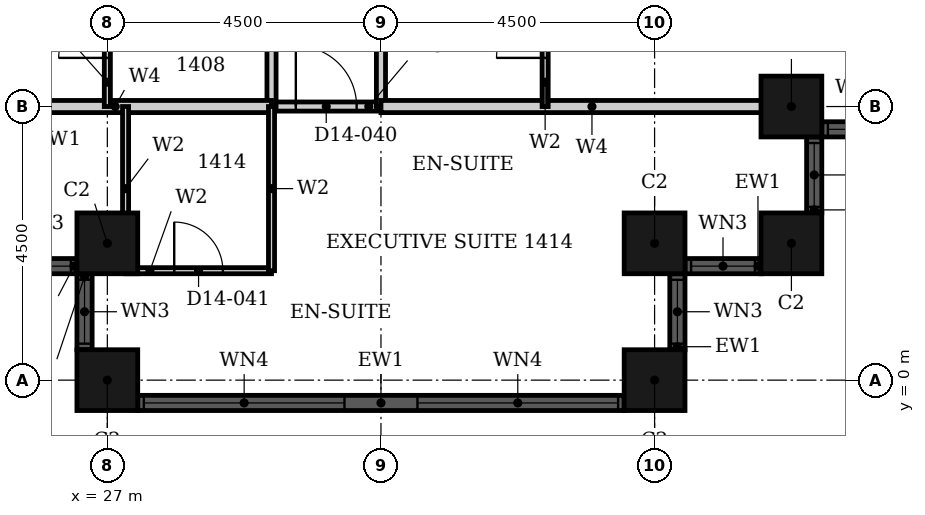
"""IFC4 building model, lengths in metres.
Left out: names, types, materials, properties, quantities, classifications, styles, units other than length and angle.
Written with IfcOpenShell. Run it as: python <this file> out.ifc"""

import sys

from ifc_helpers import new_model, si_unit, direction, frame, frame_2d, origin, origin_2d, place, context, subcontext, project, spatial, rectangle, hollow_rectangle, extrude, element, fill, save


model = new_model("IFC4")
c1 = context("Model", 3, precision=1e-05, world=origin(), true_north=direction((0.0, 1.0)))
c2 = subcontext(c1, "Body", "Model", "MODEL_VIEW")
j1 = project(units=[si_unit("LENGTHUNIT", "METRE"), si_unit("PLANEANGLEUNIT", "RADIAN")], contexts=[c1])
p1 = place(None, origin())
s1 = spatial("IfcSite", under=j1, at=p1, CompositionType="ELEMENT")
p2 = place(p1, origin())
s2 = spatial("IfcBuilding", under=s1, at=p2, CompositionType="ELEMENT")
p3 = place(p2, frame((0.0, 0.0, 63.6)))
s3 = spatial("IfcBuildingStorey", under=s2, at=p3, CompositionType="ELEMENT", Elevation=63.6)
for number, where, z_axis, x_axis in (
    (1, (27.0, 2.25, 0.0), (0.0, 0.0, 1.0), (1.0, 0.0, 0.0)),
    (2, (27.0, 0.0, 0.0), (0.0, 0.0, 1.0), (1.0, 0.0, 0.0)),
    (3, (36.0, 0.0, 0.0), (0.0, 0.0, 1.0), (1.0, 0.0, 0.0)),
    (4, (36.0, 2.25, 0.0), (0.0, 0.0, 1.0), (1.0, 0.0, 0.0)),
    (5, (38.25, 2.25, 0.0), (0.0, 0.0, 1.0), (1.0, 0.0, 0.0)),
    (6, (38.25, 4.5, 0.0), (0.0, 0.0, 1.0), (1.0, 0.0, 0.0)),
):
    element("IfcColumn", number, at=place(p3, frame(where, z_axis=z_axis, x_axis=x_axis)), inside=s3, PredefinedType="COLUMN", context=c2, shape_type="SweptSolid", body=[
        extrude(hollow_rectangle(XDim=1.0, YDim=1.0, WallThickness=0.032, at=origin_2d()), origin(), (0.0, 0.0, 1.0), 3.6),
    ])
p4 = place(p3, frame((25.25, 1.875, 0.0), z_axis=(0.0, 0.0, 1.0), x_axis=(1.0, 0.0, 0.0)))
e7 = element("IfcWall", 7, at=p4, inside=s3, PredefinedType="SOLIDWALL", context=c2, shape_type="SweptSolid", body=[
    extrude(rectangle(XDim=1.25, YDim=0.25, at=frame_2d((0.625, 0.0))), origin(), (0.0, 0.0, 1.0), 3.6),
])
p5 = place(p4, frame((0.1, 0.0, 0.9)))
e8 = element("IfcOpeningElement", 8, at=p5, cuts=e7, PredefinedType="OPENING", context=c2, shape_type="SweptSolid", body=[
    extrude(rectangle(XDim=1.05, YDim=2.08, at=frame_2d((0.525, 1.04))), frame((0.0, 0.135, 0.0), z_axis=(0.0, -1.0, 0.0), x_axis=(1.0, 0.0, 0.0)), (0.0, 0.0, 1.0), 0.27),
])
p6 = place(p3, frame((26.625, 1.75, 0.0), z_axis=(0.0, 0.0, 1.0), x_axis=(0.0, -1.0, 0.0)))
e9 = element("IfcWall", 9, at=p6, inside=s3, PredefinedType="SOLIDWALL", context=c2, shape_type="SweptSolid", body=[
    extrude(rectangle(XDim=1.25, YDim=0.25, at=frame_2d((0.625, 0.0))), origin(), (0.0, 0.0, 1.0), 3.6),
])
p7 = place(p6, frame((0.1, 0.0, 0.9)))
e10 = element("IfcOpeningElement", 10, at=p7, cuts=e9, PredefinedType="OPENING", context=c2, shape_type="SweptSolid", body=[
    extrude(rectangle(XDim=1.05, YDim=2.08, at=frame_2d((0.525, 1.04))), frame((0.0, 0.135, 0.0), z_axis=(0.0, -1.0, 0.0), x_axis=(1.0, 0.0, 0.0)), (0.0, 0.0, 1.0), 0.27),
])
p8 = place(p3, frame((27.5, -0.375, 0.0), z_axis=(0.0, 0.0, 1.0), x_axis=(1.0, 0.0, 0.0)))
e11 = element("IfcWall", 11, at=p8, inside=s3, PredefinedType="SOLIDWALL", context=c2, shape_type="SweptSolid", body=[
    extrude(rectangle(XDim=8.0, YDim=0.25, at=frame_2d((4.0, 0.0))), origin(), (0.0, 0.0, 1.0), 3.6),
])
p9 = place(p8, frame((0.1, 0.0, 0.9)))
e12 = element("IfcOpeningElement", 12, at=p9, cuts=e11, PredefinedType="OPENING", context=c2, shape_type="SweptSolid", body=[
    extrude(rectangle(XDim=3.3, YDim=2.08, at=frame_2d((1.65, 1.04))), frame((0.0, 0.135, 0.0), z_axis=(0.0, -1.0, 0.0), x_axis=(1.0, 0.0, 0.0)), (0.0, 0.0, 1.0), 0.27),
])
p10 = place(p8, frame((4.6, 0.0, 0.9)))
e13 = element("IfcOpeningElement", 13, at=p10, cuts=e11, PredefinedType="OPENING", context=c2, shape_type="SweptSolid", body=[
    extrude(rectangle(XDim=3.3, YDim=2.08, at=frame_2d((1.65, 1.04))), frame((0.0, 0.135, 0.0), z_axis=(0.0, -1.0, 0.0), x_axis=(1.0, 0.0, 0.0)), (0.0, 0.0, 1.0), 0.27),
])
p11 = place(p3, frame((36.375, 0.5, 0.0), z_axis=(0.0, 0.0, 1.0), x_axis=(0.0, 1.0, 0.0)))
e14 = element("IfcWall", 14, at=p11, inside=s3, PredefinedType="SOLIDWALL", context=c2, shape_type="SweptSolid", body=[
    extrude(rectangle(XDim=1.25, YDim=0.25, at=frame_2d((0.625, 0.0))), origin(), (0.0, 0.0, 1.0), 3.6),
])
p12 = place(p11, frame((0.1, 0.0, 0.9)))
e15 = element("IfcOpeningElement", 15, at=p12, cuts=e14, PredefinedType="OPENING", context=c2, shape_type="SweptSolid", body=[
    extrude(rectangle(XDim=1.05, YDim=2.08, at=frame_2d((0.525, 1.04))), frame((0.0, 0.135, 0.0), z_axis=(0.0, -1.0, 0.0), x_axis=(1.0, 0.0, 0.0)), (0.0, 0.0, 1.0), 0.27),
])
p13 = place(p3, frame((36.5, 1.875, 0.0), z_axis=(0.0, 0.0, 1.0), x_axis=(1.0, 0.0, 0.0)))
e16 = element("IfcWall", 16, at=p13, inside=s3, PredefinedType="SOLIDWALL", context=c2, shape_type="SweptSolid", body=[
    extrude(rectangle(XDim=1.25, YDim=0.25, at=frame_2d((0.625, 0.0))), origin(), (0.0, 0.0, 1.0), 3.6),
])
p14 = place(p13, frame((0.1, 0.0, 0.9)))
e17 = element("IfcOpeningElement", 17, at=p14, cuts=e16, PredefinedType="OPENING", context=c2, shape_type="SweptSolid", body=[
    extrude(rectangle(XDim=1.05, YDim=2.08, at=frame_2d((0.525, 1.04))), frame((0.0, 0.135, 0.0), z_axis=(0.0, -1.0, 0.0), x_axis=(1.0, 0.0, 0.0)), (0.0, 0.0, 1.0), 0.27),
])
p15 = place(p3, frame((38.625, 2.75, 0.0), z_axis=(0.0, 0.0, 1.0), x_axis=(0.0, 1.0, 0.0)))
e18 = element("IfcWall", 18, at=p15, inside=s3, PredefinedType="SOLIDWALL", context=c2, shape_type="SweptSolid", body=[
    extrude(rectangle(XDim=1.25, YDim=0.25, at=frame_2d((0.625, 0.0))), origin(), (0.0, 0.0, 1.0), 3.6),
])
p16 = place(p15, frame((0.1, 0.0, 0.9)))
e19 = element("IfcOpeningElement", 19, at=p16, cuts=e18, PredefinedType="OPENING", context=c2, shape_type="SweptSolid", body=[
    extrude(rectangle(XDim=1.05, YDim=2.08, at=frame_2d((0.525, 1.04))), frame((0.0, 0.135, 0.0), z_axis=(0.0, -1.0, 0.0), x_axis=(1.0, 0.0, 0.0)), (0.0, 0.0, 1.0), 0.27),
])
p17 = place(p3, frame((38.75, 4.125, 0.0), z_axis=(0.0, 0.0, 1.0), x_axis=(1.0, 0.0, 0.0)))
e20 = element("IfcWall", 20, at=p17, inside=s3, PredefinedType="SOLIDWALL", context=c2, shape_type="SweptSolid", body=[
    extrude(rectangle(XDim=1.25, YDim=0.25, at=frame_2d((0.625, 0.0))), origin(), (0.0, 0.0, 1.0), 3.6),
])
p18 = place(p17, frame((0.1, 0.0, 0.9)))
e21 = element("IfcOpeningElement", 21, at=p18, cuts=e20, PredefinedType="OPENING", context=c2, shape_type="SweptSolid", body=[
    extrude(rectangle(XDim=1.05, YDim=2.08, at=frame_2d((0.525, 1.04))), frame((0.0, 0.135, 0.0), z_axis=(0.0, -1.0, 0.0), x_axis=(1.0, 0.0, 0.0)), (0.0, 0.0, 1.0), 0.27),
])
p19 = place(p3, frame((29.7, 4.5, 0.0), z_axis=(0.0, 0.0, 1.0), x_axis=(1.0, 0.0, 0.0)))
e22 = element("IfcWall", 22, at=p19, inside=s3, PredefinedType="PARTITIONING", context=c2, shape_type="SweptSolid", body=[
    extrude(rectangle(XDim=1.8, YDim=0.15, at=frame_2d((0.9, 0.0))), origin(), (0.0, 0.0, 1.0), 3.3),
])
p20 = place(p19, frame((0.4, 0.0, 0.0)))
e23 = element("IfcOpeningElement", 23, at=p20, cuts=e22, PredefinedType="OPENING", context=c2, shape_type="SweptSolid", body=[
    extrude(rectangle(XDim=1.0, YDim=2.1, at=frame_2d((0.5, 1.05))), frame((0.0, 0.085, 0.0), z_axis=(0.0, -1.0, 0.0), x_axis=(1.0, 0.0, 0.0)), (0.0, 0.0, 1.0), 0.17),
])
p21 = place(p3, frame((29.7, 4.5, 0.0), z_axis=(0.0, 0.0, 1.0), x_axis=(0.0, 1.0, 0.0)))
e24 = element("IfcWall", 24, at=p21, inside=s3, PredefinedType="PARTITIONING", context=c2, shape_type="SweptSolid", body=[
    extrude(rectangle(XDim=16.2, YDim=0.15, at=frame_2d((8.1, 0.0))), origin(), (0.0, 0.0, 1.0), 3.3),
])
p22 = place(p21, frame((6.25, 0.0, 0.0)))
e25 = element("IfcOpeningElement", 25, at=p22, cuts=e24, PredefinedType="OPENING", context=c2, shape_type="SweptSolid", body=[
    extrude(rectangle(XDim=1.0, YDim=2.1, at=frame_2d((0.5, 1.05))), frame((0.0, 0.085, 0.0), z_axis=(0.0, -1.0, 0.0), x_axis=(1.0, 0.0, 0.0)), (0.0, 0.0, 1.0), 0.17),
])
p23 = place(p3, frame((31.5, 4.5, 0.0), z_axis=(0.0, 0.0, 1.0), x_axis=(0.0, 1.0, 0.0)))
e26 = element("IfcWall", 26, at=p23, inside=s3, PredefinedType="PARTITIONING", context=c2, shape_type="SweptSolid", body=[
    extrude(rectangle(XDim=16.2, YDim=0.15, at=frame_2d((8.1, 0.0))), origin(), (0.0, 0.0, 1.0), 2.58),
])
p24 = place(p23, frame((7.45, 0.0, 0.0)))
e27 = element("IfcOpeningElement", 27, at=p24, cuts=e26, PredefinedType="OPENING", context=c2, shape_type="SweptSolid", body=[
    extrude(rectangle(XDim=1.0, YDim=2.1, at=frame_2d((0.5, 1.05))), frame((0.0, 0.085, 0.0), z_axis=(0.0, -1.0, 0.0), x_axis=(1.0, 0.0, 0.0)), (0.0, 0.0, 1.0), 0.17),
])
p25 = place(p23, frame((2.95, 0.0, 0.0)))
e28 = element("IfcOpeningElement", 28, at=p25, cuts=e26, PredefinedType="OPENING", context=c2, shape_type="SweptSolid", body=[
    extrude(rectangle(XDim=1.0, YDim=2.1, at=frame_2d((0.5, 1.05))), frame((0.0, 0.085, 0.0), z_axis=(0.0, -1.0, 0.0), x_axis=(1.0, 0.0, 0.0)), (0.0, 0.0, 1.0), 0.17),
])
p26 = place(p3, frame((31.5, 4.5, 0.0), z_axis=(0.0, 0.0, 1.0), x_axis=(1.0, 0.0, 0.0)))
e29 = element("IfcWall", 29, at=p26, inside=s3, PredefinedType="PARTITIONING", context=c2, shape_type="SweptSolid", body=[
    extrude(rectangle(XDim=6.94, YDim=0.2, at=frame_2d((3.47, 0.0))), origin(), (0.0, 0.0, 1.0), 3.3),
])
p27 = place(p3, frame((24.56, 4.5, 0.0), z_axis=(0.0, 0.0, 1.0), x_axis=(1.0, 0.0, 0.0)))
e30 = element("IfcWall", 30, at=p27, inside=s3, PredefinedType="PARTITIONING", context=c2, shape_type="SweptSolid", body=[
    extrude(rectangle(XDim=5.14, YDim=0.2, at=frame_2d((2.57, 0.0))), origin(), (0.0, 0.0, 1.0), 3.3),
])
p28 = place(p3, frame((27.3, 1.8, 0.0), z_axis=(0.0, 0.0, 1.0), x_axis=(1.0, 0.0, 0.0)))
e31 = element("IfcWall", 31, at=p28, inside=s3, PredefinedType="PARTITIONING", context=c2, shape_type="SweptSolid", body=[
    extrude(rectangle(XDim=2.4, YDim=0.1, at=frame_2d((1.2, 0.0))), origin(), (0.0, 0.0, 1.0), 3.3),
])
p29 = place(p28, frame((0.8, 0.0, 0.0)))
e32 = element("IfcOpeningElement", 32, at=p29, cuts=e31, PredefinedType="OPENING", context=c2, shape_type="SweptSolid", body=[
    extrude(rectangle(XDim=0.8, YDim=2.1, at=frame_2d((0.4, 1.05))), frame((0.0, 0.06, 0.0), z_axis=(0.0, -1.0, 0.0), x_axis=(1.0, 0.0, 0.0)), (0.0, 0.0, 1.0), 0.12),
])
p30 = place(p3, frame((27.0, 4.5, 0.0), z_axis=(0.0, 0.0, 1.0), x_axis=(0.0, 1.0, 0.0)))
e33 = element("IfcWall", 33, at=p30, inside=s3, PredefinedType="PARTITIONING", context=c2, shape_type="SweptSolid", body=[
    extrude(rectangle(XDim=2.4, YDim=0.1, at=frame_2d((1.2, 0.0))), origin(), (0.0, 0.0, 1.0), 2.58),
])
p31 = place(p30, frame((0.8, 0.0, 0.0)))
e34 = element("IfcOpeningElement", 34, at=p31, cuts=e33, PredefinedType="OPENING", context=c2, shape_type="SweptSolid", body=[
    extrude(rectangle(XDim=0.8, YDim=2.1, at=frame_2d((0.4, 1.05))), frame((0.0, 0.06, 0.0), z_axis=(0.0, -1.0, 0.0), x_axis=(1.0, 0.0, 0.0)), (0.0, 0.0, 1.0), 0.12),
])
for number, where, z_axis, x_axis in (
    (35, (27.3, 1.8, 0.0), (0.0, 0.0, 1.0), (0.0, 1.0, 0.0)),
    (36, (29.7, 1.8, 0.0), (0.0, 0.0, 1.0), (0.0, 1.0, 0.0)),
):
    element("IfcWall", number, at=place(p3, frame(where, z_axis=z_axis, x_axis=x_axis)), inside=s3, PredefinedType="PARTITIONING", context=c2, shape_type="SweptSolid", body=[
        extrude(rectangle(XDim=2.7, YDim=0.1, at=frame_2d((1.35, 0.0))), origin(), (0.0, 0.0, 1.0), 3.3),
    ])
p32 = place(p3, frame((34.2, 4.5, 0.0), z_axis=(0.0, 0.0, 1.0), x_axis=(0.0, 1.0, 0.0)))
e37 = element("IfcWall", 37, at=p32, inside=s3, PredefinedType="PARTITIONING", context=c2, shape_type="SweptSolid", body=[
    extrude(rectangle(XDim=2.4, YDim=0.1, at=frame_2d((1.2, 0.0))), origin(), (0.0, 0.0, 1.0), 3.3),
])
p33 = place(p32, frame((0.8, 0.0, 0.0)))
e38 = element("IfcOpeningElement", 38, at=p33, cuts=e37, PredefinedType="OPENING", context=c2, shape_type="SweptSolid", body=[
    extrude(rectangle(XDim=0.8, YDim=2.1, at=frame_2d((0.4, 1.05))), frame((0.0, 0.06, 0.0), z_axis=(0.0, -1.0, 0.0), x_axis=(1.0, 0.0, 0.0)), (0.0, 0.0, 1.0), 0.12),
])
p34 = place(p5, origin())
e39 = element("IfcWindow", 39, at=p34, inside=s3, PartitioningType="SINGLE_PANEL", PredefinedType="WINDOW", context=c2, shape_type="SweptSolid", body=[
    extrude(rectangle(XDim=1.05, YDim=2.08, at=frame_2d((0.525, 1.04))), frame((0.0, 0.03, 0.0), z_axis=(0.0, -1.0, 0.0), x_axis=(1.0, 0.0, 0.0)), (0.0, 0.0, 1.0), 0.06),
])
fill(e8, e39)
p35 = place(p7, origin())
e40 = element("IfcWindow", 40, at=p35, inside=s3, PartitioningType="SINGLE_PANEL", PredefinedType="WINDOW", context=c2, shape_type="SweptSolid", body=[
    extrude(rectangle(XDim=1.05, YDim=2.08, at=frame_2d((0.525, 1.04))), frame((0.0, 0.03, 0.0), z_axis=(0.0, -1.0, 0.0), x_axis=(1.0, 0.0, 0.0)), (0.0, 0.0, 1.0), 0.06),
])
fill(e10, e40)
p36 = place(p9, origin())
e41 = element("IfcWindow", 41, at=p36, inside=s3, PartitioningType="SINGLE_PANEL", PredefinedType="WINDOW", context=c2, shape_type="SweptSolid", body=[
    extrude(rectangle(XDim=3.3, YDim=2.08, at=frame_2d((1.65, 1.04))), frame((0.0, 0.03, 0.0), z_axis=(0.0, -1.0, 0.0), x_axis=(1.0, 0.0, 0.0)), (0.0, 0.0, 1.0), 0.06),
])
fill(e12, e41)
p37 = place(p10, origin())
e42 = element("IfcWindow", 42, at=p37, inside=s3, PartitioningType="SINGLE_PANEL", PredefinedType="WINDOW", context=c2, shape_type="SweptSolid", body=[
    extrude(rectangle(XDim=3.3, YDim=2.08, at=frame_2d((1.65, 1.04))), frame((0.0, 0.03, 0.0), z_axis=(0.0, -1.0, 0.0), x_axis=(1.0, 0.0, 0.0)), (0.0, 0.0, 1.0), 0.06),
])
fill(e13, e42)
p38 = place(p12, origin())
e43 = element("IfcWindow", 43, at=p38, inside=s3, PartitioningType="SINGLE_PANEL", PredefinedType="WINDOW", context=c2, shape_type="SweptSolid", body=[
    extrude(rectangle(XDim=1.05, YDim=2.08, at=frame_2d((0.525, 1.04))), frame((0.0, 0.03, 0.0), z_axis=(0.0, -1.0, 0.0), x_axis=(1.0, 0.0, 0.0)), (0.0, 0.0, 1.0), 0.06),
])
fill(e15, e43)
p39 = place(p14, origin())
e44 = element("IfcWindow", 44, at=p39, inside=s3, PartitioningType="SINGLE_PANEL", PredefinedType="WINDOW", context=c2, shape_type="SweptSolid", body=[
    extrude(rectangle(XDim=1.05, YDim=2.08, at=frame_2d((0.525, 1.04))), frame((0.0, 0.03, 0.0), z_axis=(0.0, -1.0, 0.0), x_axis=(1.0, 0.0, 0.0)), (0.0, 0.0, 1.0), 0.06),
])
fill(e17, e44)
p40 = place(p16, origin())
e45 = element("IfcWindow", 45, at=p40, inside=s3, PartitioningType="SINGLE_PANEL", PredefinedType="WINDOW", context=c2, shape_type="SweptSolid", body=[
    extrude(rectangle(XDim=1.05, YDim=2.08, at=frame_2d((0.525, 1.04))), frame((0.0, 0.03, 0.0), z_axis=(0.0, -1.0, 0.0), x_axis=(1.0, 0.0, 0.0)), (0.0, 0.0, 1.0), 0.06),
])
fill(e19, e45)
p41 = place(p18, origin())
e46 = element("IfcWindow", 46, at=p41, inside=s3, PartitioningType="SINGLE_PANEL", PredefinedType="WINDOW", context=c2, shape_type="SweptSolid", body=[
    extrude(rectangle(XDim=1.05, YDim=2.08, at=frame_2d((0.525, 1.04))), frame((0.0, 0.03, 0.0), z_axis=(0.0, -1.0, 0.0), x_axis=(1.0, 0.0, 0.0)), (0.0, 0.0, 1.0), 0.06),
])
fill(e21, e46)
p42 = place(p31, origin())
e47 = element("IfcDoor", 47, at=p42, inside=s3, OperationType="SINGLE_SWING_LEFT", PredefinedType="DOOR", context=c2, shape_type="SweptSolid", body=[
    extrude(rectangle(XDim=0.8, YDim=2.1, at=frame_2d((0.4, 1.05))), frame((0.0, 0.025, 0.0), z_axis=(0.0, -1.0, 0.0), x_axis=(1.0, 0.0, 0.0)), (0.0, 0.0, 1.0), 0.05),
])
fill(e34, e47)
p43 = place(p33, origin())
e48 = element("IfcDoor", 48, at=p43, inside=s3, OperationType="SINGLE_SWING_LEFT", PredefinedType="DOOR", context=c2, shape_type="SweptSolid", body=[
    extrude(rectangle(XDim=0.8, YDim=2.1, at=frame_2d((0.4, 1.05))), frame((0.0, 0.025, 0.0), z_axis=(0.0, -1.0, 0.0), x_axis=(1.0, 0.0, 0.0)), (0.0, 0.0, 1.0), 0.05),
])
fill(e38, e48)
p44 = place(p20, origin())
e49 = element("IfcDoor", 49, at=p44, inside=s3, OperationType="SINGLE_SWING_LEFT", PredefinedType="DOOR", context=c2, shape_type="SweptSolid", body=[
    extrude(rectangle(XDim=1.0, YDim=2.1, at=frame_2d((0.5, 1.05))), frame((0.0, 0.025, 0.0), z_axis=(0.0, -1.0, 0.0), x_axis=(1.0, 0.0, 0.0)), (0.0, 0.0, 1.0), 0.05),
])
fill(e23, e49)
p45 = place(p29, origin())
e50 = element("IfcDoor", 50, at=p45, inside=s3, OperationType="SINGLE_SWING_LEFT", PredefinedType="DOOR", context=c2, shape_type="SweptSolid", body=[
    extrude(rectangle(XDim=0.8, YDim=2.1, at=frame_2d((0.4, 1.05))), frame((0.0, 0.025, 0.0), z_axis=(0.0, -1.0, 0.0), x_axis=(1.0, 0.0, 0.0)), (0.0, 0.0, 1.0), 0.05),
])
fill(e32, e50)
save(model, sys.argv[1])
